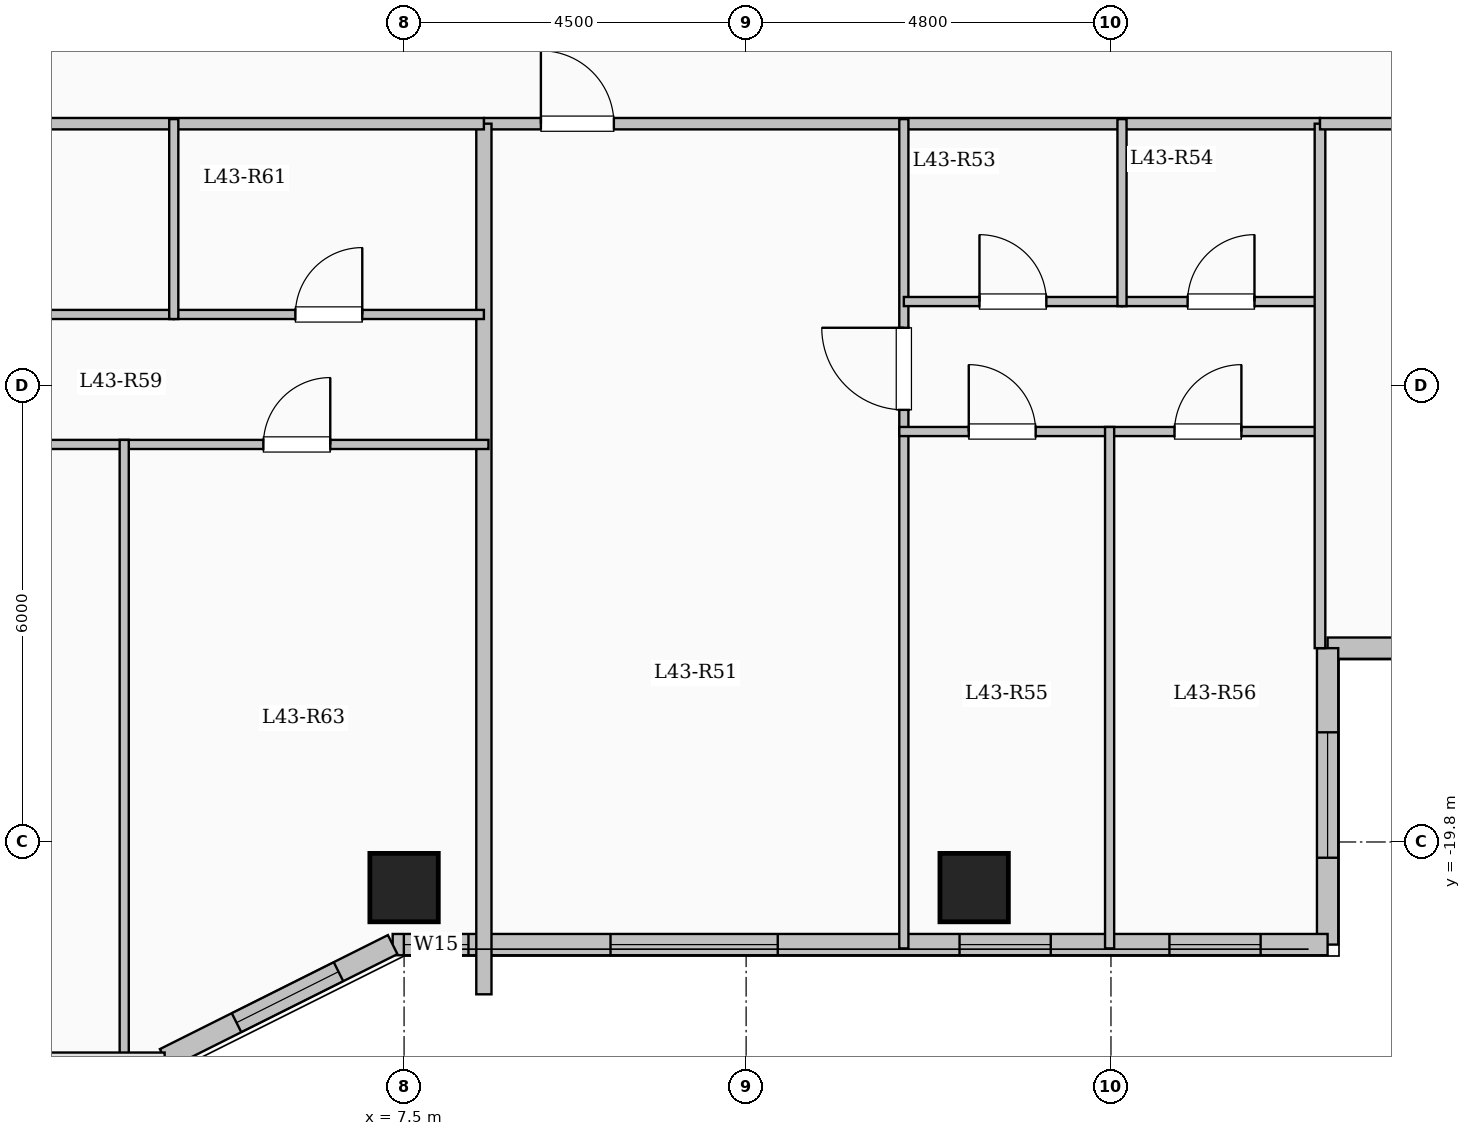
"""IFC4 building model, lengths in metres.
Left out: names, types, materials, properties, quantities, classifications, styles, units other than length and angle.
Written with IfcOpenShell. Run it as: python <this file> out.ifc"""

import sys

from ifc_helpers import new_model, si_unit, direction, frame, frame_2d, origin, origin_2d, place, context, subcontext, project, spatial, rectangle, extrude, element, fill, save


model = new_model("IFC4")
c1 = context("Model", 3, precision=1e-05, world=origin(), true_north=direction((0.0, 1.0)))
c2 = subcontext(c1, "Body", "Model", "MODEL_VIEW")
j1 = project(units=[si_unit("LENGTHUNIT", "METRE"), si_unit("PLANEANGLEUNIT", "RADIAN")], contexts=[c1])
p1 = place(None, origin())
s1 = spatial("IfcSite", under=j1, at=p1, CompositionType="ELEMENT")
p2 = place(p1, origin())
s2 = spatial("IfcBuilding", under=s1, at=p2, CompositionType="ELEMENT")
p3 = place(p2, frame((0.0, 0.0, 159.4)))
s3 = spatial("IfcBuildingStorey", under=s2, at=p3, CompositionType="ELEMENT", Elevation=159.4)
for number, where, z_axis, x_axis in (
    (1, (7.5, -20.4, 0.0), (0.0, 0.0, 1.0), (1.0, 0.0, 0.0)),
    (2, (15.0, -20.4, 0.0), (0.0, 0.0, 1.0), (1.0, 0.0, 0.0)),
):
    element("IfcColumn", number, at=place(p3, frame(where, z_axis=z_axis, x_axis=x_axis)), inside=s3, PredefinedType="COLUMN", context=c2, shape_type="SweptSolid", body=[
        extrude(rectangle(XDim=0.9, YDim=0.9, at=origin_2d()), origin(), (0.0, 0.0, 1.0), 3.35),
    ])
p4 = place(p3, frame((25.05, -17.25, 0.0), z_axis=(0.0, 0.0, 1.0), x_axis=(-1.0, 0.0, 0.0)))
e3 = element("IfcWall", 3, at=p4, inside=s3, PredefinedType="SOLIDWALL", context=c2, shape_type="SweptSolid", body=[
    extrude(rectangle(XDim=5.4, YDim=0.28, at=frame_2d((2.7, 0.0))), origin(), (0.0, 0.0, 1.0), 3.1),
])
p5 = place(p4, frame((1.625, 0.0, 0.9)))
e4 = element("IfcOpeningElement", 4, at=p5, cuts=e3, PredefinedType="OPENING", context=c2, shape_type="SweptSolid", body=[
    extrude(rectangle(XDim=2.2, YDim=1.75, at=frame_2d((1.1, 0.875))), frame((0.0, 0.15, 0.0), z_axis=(0.0, -1.0, 0.0), x_axis=(1.0, 0.0, 0.0)), (0.0, 0.0, 1.0), 0.3),
])
p6 = place(p3, frame((19.65, -17.25, 0.0), z_axis=(0.0, 0.0, 1.0), x_axis=(0.0, -1.0, 0.0)))
e5 = element("IfcWall", 5, at=p6, inside=s3, PredefinedType="SOLIDWALL", context=c2, shape_type="SweptSolid", body=[
    extrude(rectangle(XDim=3.9, YDim=0.28, at=frame_2d((1.95, 0.0))), origin(), (0.0, 0.0, 1.0), 3.1),
])
p7 = place(p6, frame((1.107, 0.0, 0.9)))
e6 = element("IfcOpeningElement", 6, at=p7, cuts=e5, PredefinedType="OPENING", context=c2, shape_type="SweptSolid", body=[
    extrude(rectangle(XDim=1.65, YDim=1.6, at=frame_2d((0.825, 0.8))), frame((0.0, 0.15, 0.0), z_axis=(0.0, -1.0, 0.0), x_axis=(1.0, 0.0, 0.0)), (0.0, 0.0, 1.0), 0.3),
])
p8 = place(p3, frame((19.65, -21.15, 0.0), z_axis=(0.0, 0.0, 1.0), x_axis=(-1.0, 0.0, 0.0)))
e7 = element("IfcWall", 7, at=p8, inside=s3, PredefinedType="SOLIDWALL", context=c2, shape_type="SweptSolid", body=[
    extrude(rectangle(XDim=12.3, YDim=0.28, at=frame_2d((6.15, 0.0))), origin(), (0.0, 0.0, 1.0), 3.1),
])
p9 = place(p8, frame((0.881, 0.0, 0.95)))
e8 = element("IfcOpeningElement", 8, at=p9, cuts=e7, PredefinedType="OPENING", context=c2, shape_type="SweptSolid", body=[
    extrude(rectangle(XDim=1.2, YDim=1.5, at=frame_2d((0.6, 0.75))), frame((0.0, 0.15, 0.0), z_axis=(0.0, -1.0, 0.0), x_axis=(1.0, 0.0, 0.0)), (0.0, 0.0, 1.0), 0.3),
])
p10 = place(p8, frame((3.642, 0.0, 0.95)))
e9 = element("IfcOpeningElement", 9, at=p10, cuts=e7, PredefinedType="OPENING", context=c2, shape_type="SweptSolid", body=[
    extrude(rectangle(XDim=1.2, YDim=1.5, at=frame_2d((0.6, 0.75))), frame((0.0, 0.15, 0.0), z_axis=(0.0, -1.0, 0.0), x_axis=(1.0, 0.0, 0.0)), (0.0, 0.0, 1.0), 0.3),
])
p11 = place(p8, frame((7.234, 0.0, 0.9)))
e10 = element("IfcOpeningElement", 10, at=p11, cuts=e7, PredefinedType="OPENING", context=c2, shape_type="SweptSolid", body=[
    extrude(rectangle(XDim=2.2, YDim=1.75, at=frame_2d((1.1, 0.875))), frame((0.0, 0.15, 0.0), z_axis=(0.0, -1.0, 0.0), x_axis=(1.0, 0.0, 0.0)), (0.0, 0.0, 1.0), 0.3),
])
p12 = place(p8, frame((11.303, 0.0, 0.95)))
e11 = element("IfcOpeningElement", 11, at=p12, cuts=e7, PredefinedType="OPENING", context=c2, shape_type="SweptSolid", body=[
    extrude(rectangle(XDim=0.85, YDim=1.5, at=frame_2d((0.425, 0.75))), frame((0.0, 0.15, 0.0), z_axis=(0.0, -1.0, 0.0), x_axis=(1.0, 0.0, 0.0)), (0.0, 0.0, 1.0), 0.3),
])
p13 = place(p3, frame((7.35, -21.15, 0.0), z_axis=(0.0, 0.0, 1.0), x_axis=(-0.894427191, -0.4472135955, 0.0)))
e12 = element("IfcWall", 12, at=p13, inside=s3, PredefinedType="SOLIDWALL", context=c2, shape_type="SweptSolid", body=[
    extrude(rectangle(XDim=3.354, YDim=0.28, at=frame_2d((1.677, 0.0))), origin(), (0.0, 0.0, 1.0), 3.1),
])
p14 = place(p13, frame((0.797, 0.0, 0.9)))
e13 = element("IfcOpeningElement", 13, at=p14, cuts=e12, PredefinedType="OPENING", context=c2, shape_type="SweptSolid", body=[
    extrude(rectangle(XDim=1.5, YDim=1.65, at=frame_2d((0.75, 0.825))), frame((0.0, 0.15, 0.0), z_axis=(0.0, -1.0, 0.0), x_axis=(1.0, 0.0, 0.0)), (0.0, 0.0, 1.0), 0.3),
])
p15 = place(p3, frame((8.55, -10.35, 0.0), z_axis=(0.0, 0.0, 1.0), x_axis=(1.0, 0.0, 0.0)))
e14 = element("IfcWall", 14, at=p15, inside=s3, PredefinedType="PARTITIONING", context=c2, shape_type="SweptSolid", body=[
    extrude(rectangle(XDim=11.0, YDim=0.15, at=frame_2d((5.5, 0.0))), origin(), (0.0, 0.0, 1.0), 3.1),
])
p16 = place(p15, frame((0.75, 0.0, 0.0)))
e15 = element("IfcOpeningElement", 15, at=p16, cuts=e14, PredefinedType="OPENING", context=c2, shape_type="SweptSolid", body=[
    extrude(rectangle(XDim=0.96, YDim=2.15, at=frame_2d((0.48, 1.075))), frame((0.0, 0.085, 0.0), z_axis=(0.0, -1.0, 0.0), x_axis=(1.0, 0.0, 0.0)), (0.0, 0.0, 1.0), 0.17),
])
p17 = place(p3, frame((14.075, -21.2, 0.0), z_axis=(0.0, 0.0, 1.0), x_axis=(0.0, 1.0, 0.0)))
e16 = element("IfcWall", 16, at=p17, inside=s3, PredefinedType="PARTITIONING", context=c2, shape_type="SweptSolid", body=[
    extrude(rectangle(XDim=10.91, YDim=0.12, at=frame_2d((5.455, 0.0))), origin(), (0.0, 0.0, 1.0), 3.1),
])
p18 = place(p17, frame((7.085, 0.0, 0.0)))
e17 = element("IfcOpeningElement", 17, at=p18, cuts=e16, PredefinedType="OPENING", context=c2, shape_type="SweptSolid", body=[
    extrude(rectangle(XDim=1.08, YDim=2.15, at=frame_2d((0.54, 1.075))), frame((0.0, 0.07, 0.0), z_axis=(0.0, -1.0, 0.0), x_axis=(1.0, 0.0, 0.0)), (0.0, 0.0, 1.0), 0.14),
])
p19 = place(p3, frame((14.075, -12.69, 0.0), z_axis=(0.0, 0.0, 1.0), x_axis=(1.0, 0.0, 0.0)))
e18 = element("IfcWall", 18, at=p19, inside=s3, PredefinedType="PARTITIONING", context=c2, shape_type="SweptSolid", body=[
    extrude(rectangle(XDim=2.87, YDim=0.12, at=frame_2d((1.435, 0.0))), origin(), (0.0, 0.0, 1.0), 3.1),
])
p20 = place(p19, frame((0.995, 0.0, 0.0)))
e19 = element("IfcOpeningElement", 19, at=p20, cuts=e18, PredefinedType="OPENING", context=c2, shape_type="SweptSolid", body=[
    extrude(rectangle(XDim=0.88, YDim=2.1, at=frame_2d((0.44, 1.05))), frame((0.0, 0.07, 0.0), z_axis=(0.0, -1.0, 0.0), x_axis=(1.0, 0.0, 0.0)), (0.0, 0.0, 1.0), 0.14),
])
p21 = place(p3, frame((16.945, -12.69, 0.0), z_axis=(0.0, 0.0, 1.0), x_axis=(1.0, 0.0, 0.0)))
e20 = element("IfcWall", 20, at=p21, inside=s3, PredefinedType="PARTITIONING", context=c2, shape_type="SweptSolid", body=[
    extrude(rectangle(XDim=2.605, YDim=0.12, at=frame_2d((1.302, 0.0))), origin(), (0.0, 0.0, 1.0), 3.1),
])
p22 = place(p21, frame((0.863, 0.0, 0.0)))
e21 = element("IfcOpeningElement", 21, at=p22, cuts=e20, PredefinedType="OPENING", context=c2, shape_type="SweptSolid", body=[
    extrude(rectangle(XDim=0.88, YDim=2.1, at=frame_2d((0.44, 1.05))), frame((0.0, 0.07, 0.0), z_axis=(0.0, -1.0, 0.0), x_axis=(1.0, 0.0, 0.0)), (0.0, 0.0, 1.0), 0.14),
])
p23 = place(p3, frame((14.015, -14.4, 0.0), z_axis=(0.0, 0.0, 1.0), x_axis=(1.0, 0.0, 0.0)))
e22 = element("IfcWall", 22, at=p23, inside=s3, PredefinedType="PARTITIONING", context=c2, shape_type="SweptSolid", body=[
    extrude(rectangle(XDim=5.595, YDim=0.12, at=frame_2d((2.798, 0.0))), origin(), (0.0, 0.0, 1.0), 3.1),
])
p24 = place(p23, frame((0.914, 0.0, 0.0)))
e23 = element("IfcOpeningElement", 23, at=p24, cuts=e22, PredefinedType="OPENING", context=c2, shape_type="SweptSolid", body=[
    extrude(rectangle(XDim=0.88, YDim=2.1, at=frame_2d((0.44, 1.05))), frame((0.0, 0.07, 0.0), z_axis=(0.0, -1.0, 0.0), x_axis=(1.0, 0.0, 0.0)), (0.0, 0.0, 1.0), 0.14),
])
p25 = place(p23, frame((3.621, 0.0, 0.0)))
e24 = element("IfcOpeningElement", 24, at=p25, cuts=e22, PredefinedType="OPENING", context=c2, shape_type="SweptSolid", body=[
    extrude(rectangle(XDim=0.88, YDim=2.1, at=frame_2d((0.44, 1.05))), frame((0.0, 0.07, 0.0), z_axis=(0.0, -1.0, 0.0), x_axis=(1.0, 0.0, 0.0)), (0.0, 0.0, 1.0), 0.14),
])
p26 = place(p3, frame((16.945, -12.75, 0.0), z_axis=(0.0, 0.0, 1.0), x_axis=(0.0, 1.0, 0.0)))
e25 = element("IfcWall", 25, at=p26, inside=s3, PredefinedType="PARTITIONING", context=c2, shape_type="SweptSolid", body=[
    extrude(rectangle(XDim=2.46, YDim=0.12, at=frame_2d((1.23, 0.0))), origin(), (0.0, 0.0, 1.0), 3.1),
])
p27 = place(p3, frame((16.782, -21.2, 0.0), z_axis=(0.0, 0.0, 1.0), x_axis=(0.0, 1.0, 0.0)))
e26 = element("IfcWall", 26, at=p27, inside=s3, PredefinedType="PARTITIONING", context=c2, shape_type="SweptSolid", body=[
    extrude(rectangle(XDim=6.86, YDim=0.12, at=frame_2d((3.43, 0.0))), origin(), (0.0, 0.0, 1.0), 3.1),
])
p28 = place(p3, frame((8.55, -21.804, 0.0), z_axis=(0.0, 0.0, 1.0), x_axis=(0.0, 1.0, 0.0)))
e27 = element("IfcWall", 27, at=p28, inside=s3, PredefinedType="SOLIDWALL", context=c2, shape_type="SweptSolid", body=[
    extrude(rectangle(XDim=11.454, YDim=0.2, at=frame_2d((5.727, 0.0))), origin(), (0.0, 0.0, 1.0), 3.1),
])
p29 = place(p3, frame((-8.55, -10.35, 0.0), z_axis=(0.0, 0.0, 1.0), x_axis=(1.0, 0.0, 0.0)))
e28 = element("IfcWall", 28, at=p29, inside=s3, PredefinedType="PARTITIONING", context=c2, shape_type="SweptSolid", body=[
    extrude(rectangle(XDim=17.1, YDim=0.15, at=frame_2d((8.55, 0.0))), origin(), (0.0, 0.0, 1.0), 3.1),
])
p30 = place(p29, frame((1.6, 0.0, 0.0)))
e29 = element("IfcOpeningElement", 29, at=p30, cuts=e28, PredefinedType="OPENING", context=c2, shape_type="SweptSolid", body=[
    extrude(rectangle(XDim=0.96, YDim=2.15, at=frame_2d((0.48, 1.075))), frame((0.0, 0.085, 0.0), z_axis=(0.0, -1.0, 0.0), x_axis=(1.0, 0.0, 0.0)), (0.0, 0.0, 1.0), 0.17),
])
p31 = place(p3, frame((-0.845, -12.86, 0.0), z_axis=(0.0, 0.0, 1.0), x_axis=(1.0, 0.0, 0.0)))
e30 = element("IfcWall", 30, at=p31, inside=s3, PredefinedType="PARTITIONING", context=c2, shape_type="SweptSolid", body=[
    extrude(rectangle(XDim=5.315, YDim=0.12, at=frame_2d((2.657, 0.0))), origin(), (0.0, 0.0, 1.0), 3.1),
])
p32 = place(p31, frame((2.217, 0.0, 0.0)))
e31 = element("IfcOpeningElement", 31, at=p32, cuts=e30, PredefinedType="OPENING", context=c2, shape_type="SweptSolid", body=[
    extrude(rectangle(XDim=0.88, YDim=2.1, at=frame_2d((0.44, 1.05))), frame((0.0, 0.07, 0.0), z_axis=(0.0, -1.0, 0.0), x_axis=(1.0, 0.0, 0.0)), (0.0, 0.0, 1.0), 0.14),
])
p33 = place(p3, frame((4.47, -12.86, 0.0), z_axis=(0.0, 0.0, 1.0), x_axis=(1.0, 0.0, 0.0)))
e32 = element("IfcWall", 32, at=p33, inside=s3, PredefinedType="PARTITIONING", context=c2, shape_type="SweptSolid", body=[
    extrude(rectangle(XDim=4.08, YDim=0.12, at=frame_2d((2.04, 0.0))), origin(), (0.0, 0.0, 1.0), 3.1),
])
p34 = place(p33, frame((1.6, 0.0, 0.0)))
e33 = element("IfcOpeningElement", 33, at=p34, cuts=e32, PredefinedType="OPENING", context=c2, shape_type="SweptSolid", body=[
    extrude(rectangle(XDim=0.88, YDim=2.1, at=frame_2d((0.44, 1.05))), frame((0.0, 0.07, 0.0), z_axis=(0.0, -1.0, 0.0), x_axis=(1.0, 0.0, 0.0)), (0.0, 0.0, 1.0), 0.14),
])
p35 = place(p3, frame((-0.905, -14.57, 0.0), z_axis=(0.0, 0.0, 1.0), x_axis=(1.0, 0.0, 0.0)))
e34 = element("IfcWall", 34, at=p35, inside=s3, PredefinedType="PARTITIONING", context=c2, shape_type="SweptSolid", body=[
    extrude(rectangle(XDim=9.515, YDim=0.12, at=frame_2d((4.758, 0.0))), origin(), (0.0, 0.0, 1.0), 3.1),
])
p36 = place(p35, frame((1.891, 0.0, 0.0)))
e35 = element("IfcOpeningElement", 35, at=p36, cuts=e34, PredefinedType="OPENING", context=c2, shape_type="SweptSolid", body=[
    extrude(rectangle(XDim=0.88, YDim=2.1, at=frame_2d((0.44, 1.05))), frame((0.0, 0.07, 0.0), z_axis=(0.0, -1.0, 0.0), x_axis=(1.0, 0.0, 0.0)), (0.0, 0.0, 1.0), 0.14),
])
p37 = place(p35, frame((6.554, 0.0, 0.0)))
e36 = element("IfcOpeningElement", 36, at=p37, cuts=e34, PredefinedType="OPENING", context=c2, shape_type="SweptSolid", body=[
    extrude(rectangle(XDim=0.88, YDim=2.1, at=frame_2d((0.44, 1.05))), frame((0.0, 0.07, 0.0), z_axis=(0.0, -1.0, 0.0), x_axis=(1.0, 0.0, 0.0)), (0.0, 0.0, 1.0), 0.14),
])
p38 = place(p3, frame((4.47, -12.92, 0.0), z_axis=(0.0, 0.0, 1.0), x_axis=(0.0, 1.0, 0.0)))
e37 = element("IfcWall", 37, at=p38, inside=s3, PredefinedType="PARTITIONING", context=c2, shape_type="SweptSolid", body=[
    extrude(rectangle(XDim=2.63, YDim=0.12, at=frame_2d((1.315, 0.0))), origin(), (0.0, 0.0, 1.0), 3.1),
])
p39 = place(p3, frame((3.818, -22.68, 0.0), z_axis=(0.0, 0.0, 1.0), x_axis=(0.0, 1.0, 0.0)))
e38 = element("IfcWall", 38, at=p39, inside=s3, PredefinedType="PARTITIONING", context=c2, shape_type="SweptSolid", body=[
    extrude(rectangle(XDim=8.17, YDim=0.12, at=frame_2d((4.085, 0.0))), origin(), (0.0, 0.0, 1.0), 3.1),
])
p40 = place(p3, frame((19.55, -17.25, 0.0), z_axis=(0.0, 0.0, 1.0), x_axis=(0.0, 1.0, 0.0)))
e39 = element("IfcWall", 39, at=p40, inside=s3, PredefinedType="PARTITIONING", context=c2, shape_type="SweptSolid", body=[
    extrude(rectangle(XDim=6.9, YDim=0.14, at=frame_2d((3.45, 0.0))), origin(), (0.0, 0.0, 1.0), 3.1),
])
p41 = place(p3, frame((19.55, -10.35, 0.0), z_axis=(0.0, 0.0, 1.0), x_axis=(1.0, 0.0, 0.0)))
e40 = element("IfcWall", 40, at=p41, inside=s3, PredefinedType="PARTITIONING", context=c2, shape_type="SweptSolid", body=[
    extrude(rectangle(XDim=5.53, YDim=0.15, at=frame_2d((2.765, 0.0))), origin(), (0.0, 0.0, 1.0), 3.1),
])
p42 = place(p41, frame((2.29, 0.0, 0.0)))
e41 = element("IfcOpeningElement", 41, at=p42, cuts=e40, PredefinedType="OPENING", context=c2, shape_type="SweptSolid", body=[
    extrude(rectangle(XDim=0.95, YDim=2.15, at=frame_2d((0.475, 1.075))), frame((0.0, 0.085, 0.0), z_axis=(0.0, -1.0, 0.0), x_axis=(1.0, 0.0, 0.0)), (0.0, 0.0, 1.0), 0.17),
])
p43 = place(p7, origin())
e42 = element("IfcWindow", 42, at=p43, inside=s3, PartitioningType="SINGLE_PANEL", PredefinedType="WINDOW", context=c2, shape_type="SweptSolid", body=[
    extrude(rectangle(XDim=1.65, YDim=1.6, at=frame_2d((0.825, 0.8))), frame((0.0, 0.03, 0.0), z_axis=(0.0, -1.0, 0.0), x_axis=(1.0, 0.0, 0.0)), (0.0, 0.0, 1.0), 0.06),
])
fill(e6, e42)
p44 = place(p9, origin())
e43 = element("IfcWindow", 43, at=p44, inside=s3, PartitioningType="SINGLE_PANEL", PredefinedType="WINDOW", context=c2, shape_type="SweptSolid", body=[
    extrude(rectangle(XDim=1.2, YDim=1.5, at=frame_2d((0.6, 0.75))), frame((0.0, 0.03, 0.0), z_axis=(0.0, -1.0, 0.0), x_axis=(1.0, 0.0, 0.0)), (0.0, 0.0, 1.0), 0.06),
])
fill(e8, e43)
p45 = place(p10, origin())
e44 = element("IfcWindow", 44, at=p45, inside=s3, PartitioningType="SINGLE_PANEL", PredefinedType="WINDOW", context=c2, shape_type="SweptSolid", body=[
    extrude(rectangle(XDim=1.2, YDim=1.5, at=frame_2d((0.6, 0.75))), frame((0.0, 0.03, 0.0), z_axis=(0.0, -1.0, 0.0), x_axis=(1.0, 0.0, 0.0)), (0.0, 0.0, 1.0), 0.06),
])
fill(e9, e44)
p46 = place(p11, origin())
e45 = element("IfcWindow", 45, at=p46, inside=s3, PartitioningType="SINGLE_PANEL", PredefinedType="WINDOW", context=c2, shape_type="SweptSolid", body=[
    extrude(rectangle(XDim=2.2, YDim=1.75, at=frame_2d((1.1, 0.875))), frame((0.0, 0.03, 0.0), z_axis=(0.0, -1.0, 0.0), x_axis=(1.0, 0.0, 0.0)), (0.0, 0.0, 1.0), 0.06),
])
fill(e10, e45)
p47 = place(p12, origin())
e46 = element("IfcWindow", 46, at=p47, inside=s3, PartitioningType="SINGLE_PANEL", PredefinedType="WINDOW", context=c2, shape_type="SweptSolid", body=[
    extrude(rectangle(XDim=0.85, YDim=1.5, at=frame_2d((0.425, 0.75))), frame((0.0, 0.03, 0.0), z_axis=(0.0, -1.0, 0.0), x_axis=(1.0, 0.0, 0.0)), (0.0, 0.0, 1.0), 0.06),
])
fill(e11, e46)
p48 = place(p14, origin())
e47 = element("IfcWindow", 47, at=p48, inside=s3, PartitioningType="SINGLE_PANEL", PredefinedType="WINDOW", context=c2, shape_type="SweptSolid", body=[
    extrude(rectangle(XDim=1.5, YDim=1.65, at=frame_2d((0.75, 0.825))), frame((0.0, 0.03, 0.0), z_axis=(0.0, -1.0, 0.0), x_axis=(1.0, 0.0, 0.0)), (0.0, 0.0, 1.0), 0.06),
])
fill(e13, e47)
p49 = place(p16, origin())
e48 = element("IfcDoor", 48, at=p49, inside=s3, OperationType="SINGLE_SWING_LEFT", PredefinedType="DOOR", context=c2, shape_type="SweptSolid", body=[
    extrude(rectangle(XDim=0.96, YDim=2.15, at=frame_2d((0.48, 1.075))), frame((0.0, 0.025, 0.0), z_axis=(0.0, -1.0, 0.0), x_axis=(1.0, 0.0, 0.0)), (0.0, 0.0, 1.0), 0.05),
])
fill(e15, e48)
p50 = place(p18, origin())
e49 = element("IfcDoor", 49, at=p50, inside=s3, OperationType="SINGLE_SWING_RIGHT", PredefinedType="DOOR", context=c2, shape_type="SweptSolid", body=[
    extrude(rectangle(XDim=1.08, YDim=2.15, at=frame_2d((0.54, 1.075))), frame((0.0, 0.025, 0.0), z_axis=(0.0, -1.0, 0.0), x_axis=(1.0, 0.0, 0.0)), (0.0, 0.0, 1.0), 0.05),
])
fill(e17, e49)
p51 = place(p20, origin())
e50 = element("IfcDoor", 50, at=p51, inside=s3, OperationType="SINGLE_SWING_LEFT", PredefinedType="DOOR", context=c2, shape_type="SweptSolid", body=[
    extrude(rectangle(XDim=0.88, YDim=2.1, at=frame_2d((0.44, 1.05))), frame((0.0, 0.025, 0.0), z_axis=(0.0, -1.0, 0.0), x_axis=(1.0, 0.0, 0.0)), (0.0, 0.0, 1.0), 0.05),
])
fill(e19, e50)
p52 = place(p22, origin())
e51 = element("IfcDoor", 51, at=p52, inside=s3, OperationType="SINGLE_SWING_RIGHT", PredefinedType="DOOR", context=c2, shape_type="SweptSolid", body=[
    extrude(rectangle(XDim=0.88, YDim=2.1, at=frame_2d((0.44, 1.05))), frame((0.0, 0.025, 0.0), z_axis=(0.0, -1.0, 0.0), x_axis=(1.0, 0.0, 0.0)), (0.0, 0.0, 1.0), 0.05),
])
fill(e21, e51)
p53 = place(p24, origin())
e52 = element("IfcDoor", 52, at=p53, inside=s3, OperationType="SINGLE_SWING_LEFT", PredefinedType="DOOR", context=c2, shape_type="SweptSolid", body=[
    extrude(rectangle(XDim=0.88, YDim=2.1, at=frame_2d((0.44, 1.05))), frame((0.0, 0.025, 0.0), z_axis=(0.0, -1.0, 0.0), x_axis=(1.0, 0.0, 0.0)), (0.0, 0.0, 1.0), 0.05),
])
fill(e23, e52)
p54 = place(p25, origin())
e53 = element("IfcDoor", 53, at=p54, inside=s3, OperationType="SINGLE_SWING_RIGHT", PredefinedType="DOOR", context=c2, shape_type="SweptSolid", body=[
    extrude(rectangle(XDim=0.88, YDim=2.1, at=frame_2d((0.44, 1.05))), frame((0.0, 0.025, 0.0), z_axis=(0.0, -1.0, 0.0), x_axis=(1.0, 0.0, 0.0)), (0.0, 0.0, 1.0), 0.05),
])
fill(e24, e53)
p55 = place(p34, origin())
e54 = element("IfcDoor", 54, at=p55, inside=s3, OperationType="SINGLE_SWING_RIGHT", PredefinedType="DOOR", context=c2, shape_type="SweptSolid", body=[
    extrude(rectangle(XDim=0.88, YDim=2.1, at=frame_2d((0.44, 1.05))), frame((0.0, 0.025, 0.0), z_axis=(0.0, -1.0, 0.0), x_axis=(1.0, 0.0, 0.0)), (0.0, 0.0, 1.0), 0.05),
])
fill(e33, e54)
p56 = place(p37, origin())
e55 = element("IfcDoor", 55, at=p56, inside=s3, OperationType="SINGLE_SWING_RIGHT", PredefinedType="DOOR", context=c2, shape_type="SweptSolid", body=[
    extrude(rectangle(XDim=0.88, YDim=2.1, at=frame_2d((0.44, 1.05))), frame((0.0, 0.025, 0.0), z_axis=(0.0, -1.0, 0.0), x_axis=(1.0, 0.0, 0.0)), (0.0, 0.0, 1.0), 0.05),
])
fill(e36, e55)
save(model, sys.argv[1])
